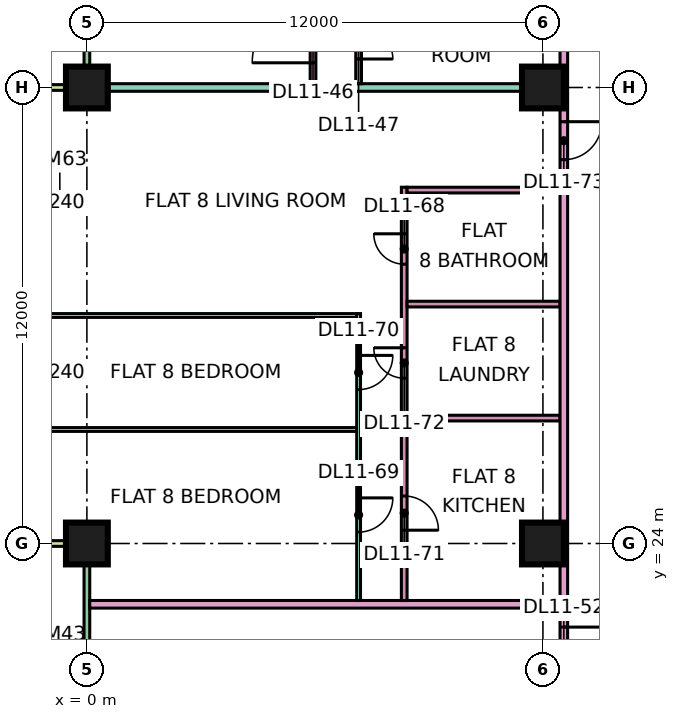
"""IFC4 building model, lengths in metres.
Left out: names, types, materials, properties, quantities, classifications, styles, units other than length and angle.
Written with IfcOpenShell. Run it as: python <this file> out.ifc"""

import sys

from ifc_helpers import new_model, si_unit, direction, frame, frame_2d, origin, origin_2d, place, context, subcontext, project, spatial, rectangle, extrude, element, fill, save


model = new_model("IFC4")
c1 = context("Model", 3, precision=1e-05, world=origin(), true_north=direction((0.0, 1.0)))
c2 = subcontext(c1, "Body", "Model", "MODEL_VIEW")
j1 = project(units=[si_unit("LENGTHUNIT", "METRE"), si_unit("PLANEANGLEUNIT", "RADIAN")], contexts=[c1])
p1 = place(None, origin())
s1 = spatial("IfcSite", under=j1, at=p1, CompositionType="ELEMENT")
p2 = place(p1, origin())
s2 = spatial("IfcBuilding", under=s1, at=p2, CompositionType="ELEMENT")
p3 = place(p2, frame((0.0, 0.0, 56.4)))
s3 = spatial("IfcBuildingStorey", under=s2, at=p3, CompositionType="ELEMENT", Elevation=56.4)
p4 = place(p3, frame((0.0, 24.0, 0.0), z_axis=(0.0, 0.0, 1.0), x_axis=(1.0, 0.0, 0.0)))
e1 = element("IfcColumn", 1, at=p4, inside=s3, PredefinedType="COLUMN", context=c2, shape_type="SweptSolid", body=[
    extrude(rectangle(XDim=1.1, YDim=1.1, at=origin_2d()), origin(), (0.0, 0.0, 1.0), 3.75),
])
p5 = place(p3, frame((0.0, 36.0, 0.0), z_axis=(0.0, 0.0, 1.0), x_axis=(1.0, 0.0, 0.0)))
e2 = element("IfcColumn", 2, at=p5, inside=s3, PredefinedType="COLUMN", context=c2, shape_type="SweptSolid", body=[
    extrude(rectangle(XDim=1.1, YDim=1.1, at=origin_2d()), origin(), (0.0, 0.0, 1.0), 3.75),
])
for number, where, z_axis, x_axis in (
    (3, (12.0, 24.0, 0.0), (0.0, 0.0, 1.0), (1.0, 0.0, 0.0)),
    (4, (12.0, 36.0, 0.0), (0.0, 0.0, 1.0), (1.0, 0.0, 0.0)),
):
    element("IfcColumn", number, at=place(p3, frame(where, z_axis=z_axis, x_axis=x_axis)), inside=s3, PredefinedType="COLUMN", context=c2, shape_type="SweptSolid", body=[
        extrude(rectangle(XDim=1.1, YDim=1.1, at=origin_2d()), origin(), (0.0, 0.0, 1.0), 3.75),
    ])
p6 = place(p3, frame((0.0, 47.925, 0.0), z_axis=(0.0, 0.0, 1.0), x_axis=(0.0, -1.0, 0.0)))
e5 = element("IfcWall", 5, at=p6, inside=s3, PredefinedType="SOLIDWALL", context=c2, shape_type="SweptSolid", body=[
    extrude(rectangle(XDim=11.85, YDim=0.15, at=frame_2d((5.925, 0.0))), origin(), (0.0, 0.0, 1.0), 3.35),
])
p7 = place(p6, frame((0.538, 0.0, 0.45)))
e6 = element("IfcOpeningElement", 6, at=p7, cuts=e5, PredefinedType="OPENING", context=c2, shape_type="SweptSolid", body=[
    extrude(rectangle(XDim=1.2, YDim=2.4, at=frame_2d((0.6, 1.2))), frame((0.0, 0.085, 0.0), z_axis=(0.0, -1.0, 0.0), x_axis=(1.0, 0.0, 0.0)), (0.0, 0.0, 1.0), 0.17),
])
p8 = place(p6, frame((4.15, 0.0, 0.45)))
e7 = element("IfcOpeningElement", 7, at=p8, cuts=e5, PredefinedType="OPENING", context=c2, shape_type="SweptSolid", body=[
    extrude(rectangle(XDim=1.2, YDim=2.4, at=frame_2d((0.6, 1.2))), frame((0.0, 0.085, 0.0), z_axis=(0.0, -1.0, 0.0), x_axis=(1.0, 0.0, 0.0)), (0.0, 0.0, 1.0), 0.17),
])
p9 = place(p6, frame((6.525, 0.0, 0.0)))
e8 = element("IfcOpeningElement", 8, at=p9, cuts=e5, PredefinedType="OPENING", context=c2, shape_type="SweptSolid", body=[
    extrude(rectangle(XDim=1.8, YDim=2.4, at=frame_2d((0.9, 1.2))), frame((0.0, 0.085, 0.0), z_axis=(0.0, -1.0, 0.0), x_axis=(1.0, 0.0, 0.0)), (0.0, 0.0, 1.0), 0.17),
])
p10 = place(p6, frame((9.5, 0.0, 0.45)))
e9 = element("IfcOpeningElement", 9, at=p10, cuts=e5, PredefinedType="OPENING", context=c2, shape_type="SweptSolid", body=[
    extrude(rectangle(XDim=1.2, YDim=2.4, at=frame_2d((0.6, 1.2))), frame((0.0, 0.085, 0.0), z_axis=(0.0, -1.0, 0.0), x_axis=(1.0, 0.0, 0.0)), (0.0, 0.0, 1.0), 0.17),
])
p11 = place(p3, frame((-1.5, 36.0, 0.0), z_axis=(0.0, 0.0, 1.0), x_axis=(1.0, 0.0, 0.0)))
e10 = element("IfcWall", 10, at=p11, inside=s3, PredefinedType="SOLIDWALL", context=c2, shape_type="SweptSolid", body=[
    extrude(rectangle(XDim=1.5, YDim=0.15, at=frame_2d((0.75, 0.0))), origin(), (0.0, 0.0, 1.0), 3.35),
])
p12 = place(p3, frame((0.0, 23.925, 0.0), z_axis=(0.0, 0.0, 1.0), x_axis=(0.0, -1.0, 0.0)))
e11 = element("IfcWall", 11, at=p12, inside=s3, PredefinedType="SOLIDWALL", context=c2, shape_type="SweptSolid", body=[
    extrude(rectangle(XDim=11.35, YDim=0.15, at=frame_2d((5.675, 0.0))), origin(), (0.0, 0.0, 1.0), 3.35),
])
p13 = place(p12, frame((6.738, 0.0, 0.0)))
e12 = element("IfcOpeningElement", 12, at=p13, cuts=e11, PredefinedType="OPENING", context=c2, shape_type="SweptSolid", body=[
    extrude(rectangle(XDim=1.8, YDim=2.4, at=frame_2d((0.9, 1.2))), frame((0.0, 0.085, 0.0), z_axis=(0.0, -1.0, 0.0), x_axis=(1.0, 0.0, 0.0)), (0.0, 0.0, 1.0), 0.17),
])
p14 = place(p3, frame((-1.5, 24.0, 0.0), z_axis=(0.0, 0.0, 1.0), x_axis=(1.0, 0.0, 0.0)))
e13 = element("IfcWall", 13, at=p14, inside=s3, PredefinedType="SOLIDWALL", context=c2, shape_type="SweptSolid", body=[
    extrude(rectangle(XDim=1.5, YDim=0.15, at=frame_2d((0.75, 0.0))), origin(), (0.0, 0.0, 1.0), 3.35),
])
p15 = place(p3, frame((-1.351, 27.0, 0.0), z_axis=(0.0, 0.0, 1.0), x_axis=(1.0, 0.0, 0.0)))
e14 = element("IfcWall", 14, at=p15, inside=s3, PredefinedType="PARTITIONING", context=c2, shape_type="SweptSolid", body=[
    extrude(rectangle(XDim=8.451, YDim=0.1, at=frame_2d((4.226, 0.0))), origin(), (0.0, 0.0, 1.0), 3.35),
])
p16 = place(p3, frame((-1.35, 30.0, 0.0), z_axis=(0.0, 0.0, 1.0), x_axis=(1.0, 0.0, 0.0)))
e15 = element("IfcWall", 15, at=p16, inside=s3, PredefinedType="PARTITIONING", context=c2, shape_type="SweptSolid", body=[
    extrude(rectangle(XDim=8.45, YDim=0.1, at=frame_2d((4.225, 0.0))), origin(), (0.0, 0.0, 1.0), 3.35),
])
e16 = element("IfcWall", 16, at=p5, inside=s3, PredefinedType="PARTITIONING", context=c2, shape_type="SweptSolid", body=[
    extrude(rectangle(XDim=12.45, YDim=0.2, at=frame_2d((6.225, 0.0))), origin(), (0.0, 0.0, 1.0), 3.35),
])
p17 = place(p3, frame((0.074, 22.4, 0.0), z_axis=(0.0, 0.0, 1.0), x_axis=(1.0, 0.0, 0.0)))
e17 = element("IfcWall", 17, at=p17, inside=s3, PredefinedType="PARTITIONING", context=c2, shape_type="SweptSolid", body=[
    extrude(rectangle(XDim=12.376, YDim=0.2, at=frame_2d((6.188, 0.0))), origin(), (0.0, 0.0, 1.0), 3.35),
])
p18 = place(p3, frame((5.95, 36.1, 0.0), z_axis=(0.0, 0.0, 1.0), x_axis=(0.0, 1.0, 0.0)))
e18 = element("IfcWall", 18, at=p18, inside=s3, PredefinedType="PARTITIONING", context=c2, shape_type="SweptSolid", body=[
    extrude(rectangle(XDim=28.25, YDim=0.15, at=frame_2d((14.125, 0.0))), origin(), (0.0, 0.0, 1.0), 3.35),
])
p19 = place(p18, frame((3.95, 0.0, 0.0)))
e19 = element("IfcOpeningElement", 19, at=p19, cuts=e18, PredefinedType="OPENING", context=c2, shape_type="SweptSolid", body=[
    extrude(rectangle(XDim=0.9, YDim=2.1, at=frame_2d((0.45, 1.05))), frame((0.0, 0.085, 0.0), z_axis=(0.0, -1.0, 0.0), x_axis=(1.0, 0.0, 0.0)), (0.0, 0.0, 1.0), 0.17),
])
p20 = place(p18, frame((12.95, 0.0, 0.0)))
e20 = element("IfcOpeningElement", 20, at=p20, cuts=e18, PredefinedType="OPENING", context=c2, shape_type="SweptSolid", body=[
    extrude(rectangle(XDim=0.9, YDim=2.1, at=frame_2d((0.45, 1.05))), frame((0.0, 0.085, 0.0), z_axis=(0.0, -1.0, 0.0), x_axis=(1.0, 0.0, 0.0)), (0.0, 0.0, 1.0), 0.17),
])
p21 = place(p18, frame((18.95, 0.0, 0.0)))
e21 = element("IfcOpeningElement", 21, at=p21, cuts=e18, PredefinedType="OPENING", context=c2, shape_type="SweptSolid", body=[
    extrude(rectangle(XDim=0.9, YDim=2.1, at=frame_2d((0.45, 1.05))), frame((0.0, 0.085, 0.0), z_axis=(0.0, -1.0, 0.0), x_axis=(1.0, 0.0, 0.0)), (0.0, 0.0, 1.0), 0.17),
])
p22 = place(p18, frame((21.95, 0.0, 0.0)))
e22 = element("IfcOpeningElement", 22, at=p22, cuts=e18, PredefinedType="OPENING", context=c2, shape_type="SweptSolid", body=[
    extrude(rectangle(XDim=0.9, YDim=2.1, at=frame_2d((0.45, 1.05))), frame((0.0, 0.085, 0.0), z_axis=(0.0, -1.0, 0.0), x_axis=(1.0, 0.0, 0.0)), (0.0, 0.0, 1.0), 0.17),
])
p23 = place(p18, frame((24.95, 0.0, 0.0)))
e23 = element("IfcOpeningElement", 23, at=p23, cuts=e18, PredefinedType="OPENING", context=c2, shape_type="SweptSolid", body=[
    extrude(rectangle(XDim=0.9, YDim=2.1, at=frame_2d((0.45, 1.05))), frame((0.0, 0.085, 0.0), z_axis=(0.0, -1.0, 0.0), x_axis=(1.0, 0.0, 0.0)), (0.0, 0.0, 1.0), 0.17),
])
p24 = place(p18, frame((15.95, 0.0, 0.0)))
e24 = element("IfcOpeningElement", 24, at=p24, cuts=e18, PredefinedType="OPENING", context=c2, shape_type="SweptSolid", body=[
    extrude(rectangle(XDim=0.9, YDim=2.1, at=frame_2d((0.45, 1.05))), frame((0.0, 0.085, 0.0), z_axis=(0.0, -1.0, 0.0), x_axis=(1.0, 0.0, 0.0)), (0.0, 0.0, 1.0), 0.17),
])
p25 = place(p18, frame((10.8, 0.0, 0.0)))
e25 = element("IfcOpeningElement", 25, at=p25, cuts=e18, PredefinedType="OPENING", context=c2, shape_type="SweptSolid", body=[
    extrude(rectangle(XDim=0.8, YDim=2.1, at=frame_2d((0.4, 1.05))), frame((0.0, 0.085, 0.0), z_axis=(0.0, -1.0, 0.0), x_axis=(1.0, 0.0, 0.0)), (0.0, 0.0, 1.0), 0.17),
])
p26 = place(p18, frame((0.55, 0.0, 0.0)))
e26 = element("IfcOpeningElement", 26, at=p26, cuts=e18, PredefinedType="OPENING", context=c2, shape_type="SweptSolid", body=[
    extrude(rectangle(XDim=1.6, YDim=2.1, at=frame_2d((0.8, 1.05))), frame((0.0, 0.085, 0.0), z_axis=(0.0, -1.0, 0.0), x_axis=(1.0, 0.0, 0.0)), (0.0, 0.0, 1.0), 0.17),
])
p27 = place(p18, frame((6.95, 0.0, 0.0)))
e27 = element("IfcOpeningElement", 27, at=p27, cuts=e18, PredefinedType="OPENING", context=c2, shape_type="SweptSolid", body=[
    extrude(rectangle(XDim=0.9, YDim=2.1, at=frame_2d((0.45, 1.05))), frame((0.0, 0.085, 0.0), z_axis=(0.0, -1.0, 0.0), x_axis=(1.0, 0.0, 0.0)), (0.0, 0.0, 1.0), 0.17),
])
p28 = place(p3, frame((7.15, 22.5, 0.0), z_axis=(0.0, 0.0, 1.0), x_axis=(0.0, 1.0, 0.0)))
e28 = element("IfcWall", 28, at=p28, inside=s3, PredefinedType="PARTITIONING", context=c2, shape_type="SweptSolid", body=[
    extrude(rectangle(XDim=7.55, YDim=0.1, at=frame_2d((3.775, 0.0))), origin(), (0.0, 0.0, 1.0), 3.35),
])
p29 = place(p28, frame((1.8, 0.0, 0.0)))
e29 = element("IfcOpeningElement", 29, at=p29, cuts=e28, PredefinedType="OPENING", context=c2, shape_type="SweptSolid", body=[
    extrude(rectangle(XDim=0.9, YDim=2.1, at=frame_2d((0.45, 1.05))), frame((0.0, 0.06, 0.0), z_axis=(0.0, -1.0, 0.0), x_axis=(1.0, 0.0, 0.0)), (0.0, 0.0, 1.0), 0.12),
])
p30 = place(p28, frame((5.55, 0.0, 0.0)))
e30 = element("IfcOpeningElement", 30, at=p30, cuts=e28, PredefinedType="OPENING", context=c2, shape_type="SweptSolid", body=[
    extrude(rectangle(XDim=0.9, YDim=2.1, at=frame_2d((0.45, 1.05))), frame((0.0, 0.06, 0.0), z_axis=(0.0, -1.0, 0.0), x_axis=(1.0, 0.0, 0.0)), (0.0, 0.0, 1.0), 0.12),
])
p31 = place(p3, frame((7.15, 36.1, 0.0), z_axis=(0.0, 0.0, 1.0), x_axis=(0.0, 1.0, 0.0)))
e31 = element("IfcWall", 31, at=p31, inside=s3, PredefinedType="PARTITIONING", context=c2, shape_type="SweptSolid", body=[
    extrude(rectangle(XDim=23.35, YDim=0.15, at=frame_2d((11.675, 0.0))), origin(), (0.0, 0.0, 1.0), 3.35),
])
p32 = place(p31, frame((10.25, 0.0, 0.0)))
e32 = element("IfcOpeningElement", 32, at=p32, cuts=e31, PredefinedType="OPENING", context=c2, shape_type="SweptSolid", body=[
    extrude(rectangle(XDim=0.8, YDim=2.1, at=frame_2d((0.4, 1.05))), frame((0.0, 0.085, 0.0), z_axis=(0.0, -1.0, 0.0), x_axis=(1.0, 0.0, 0.0)), (0.0, 0.0, 1.0), 0.17),
])
p33 = place(p31, frame((19.85, 0.0, 0.0)))
e33 = element("IfcOpeningElement", 33, at=p33, cuts=e31, PredefinedType="OPENING", context=c2, shape_type="SweptSolid", body=[
    extrude(rectangle(XDim=0.9, YDim=2.1, at=frame_2d((0.45, 1.05))), frame((0.0, 0.085, 0.0), z_axis=(0.0, -1.0, 0.0), x_axis=(1.0, 0.0, 0.0)), (0.0, 0.0, 1.0), 0.17),
])
p34 = place(p31, frame((3.65, 0.0, 0.0)))
e34 = element("IfcOpeningElement", 34, at=p34, cuts=e31, PredefinedType="OPENING", context=c2, shape_type="SweptSolid", body=[
    extrude(rectangle(XDim=0.8, YDim=2.1, at=frame_2d((0.4, 1.05))), frame((0.0, 0.085, 0.0), z_axis=(0.0, -1.0, 0.0), x_axis=(1.0, 0.0, 0.0)), (0.0, 0.0, 1.0), 0.17),
])
p35 = place(p31, frame((13.25, 0.0, 0.0)))
e35 = element("IfcOpeningElement", 35, at=p35, cuts=e31, PredefinedType="OPENING", context=c2, shape_type="SweptSolid", body=[
    extrude(rectangle(XDim=0.8, YDim=2.1, at=frame_2d((0.4, 1.05))), frame((0.0, 0.085, 0.0), z_axis=(0.0, -1.0, 0.0), x_axis=(1.0, 0.0, 0.0)), (0.0, 0.0, 1.0), 0.17),
])
p36 = place(p31, frame((15.65, 0.0, 0.0)))
e36 = element("IfcOpeningElement", 36, at=p36, cuts=e31, PredefinedType="OPENING", context=c2, shape_type="SweptSolid", body=[
    extrude(rectangle(XDim=0.8, YDim=2.1, at=frame_2d((0.4, 1.05))), frame((0.0, 0.085, 0.0), z_axis=(0.0, -1.0, 0.0), x_axis=(1.0, 0.0, 0.0)), (0.0, 0.0, 1.0), 0.17),
])
p37 = place(p31, frame((0.65, 0.0, 0.0)))
e37 = element("IfcOpeningElement", 37, at=p37, cuts=e31, PredefinedType="OPENING", context=c2, shape_type="SweptSolid", body=[
    extrude(rectangle(XDim=0.9, YDim=2.1, at=frame_2d((0.45, 1.05))), frame((0.0, 0.085, 0.0), z_axis=(0.0, -1.0, 0.0), x_axis=(1.0, 0.0, 0.0)), (0.0, 0.0, 1.0), 0.17),
])
p38 = place(p31, frame((6.95, 0.0, 0.0)))
e38 = element("IfcOpeningElement", 38, at=p38, cuts=e31, PredefinedType="OPENING", context=c2, shape_type="SweptSolid", body=[
    extrude(rectangle(XDim=0.8, YDim=2.1, at=frame_2d((0.4, 1.05))), frame((0.0, 0.085, 0.0), z_axis=(0.0, -1.0, 0.0), x_axis=(1.0, 0.0, 0.0)), (0.0, 0.0, 1.0), 0.17),
])
p39 = place(p3, frame((8.35, 22.5, 0.0), z_axis=(0.0, 0.0, 1.0), x_axis=(0.0, 1.0, 0.0)))
e39 = element("IfcWall", 39, at=p39, inside=s3, PredefinedType="PARTITIONING", context=c2, shape_type="SweptSolid", body=[
    extrude(rectangle(XDim=10.875, YDim=0.15, at=frame_2d((5.438, 0.0))), origin(), (0.0, 0.0, 1.0), 3.35),
])
p40 = place(p39, frame((8.85, 0.0, 0.0)))
e40 = element("IfcOpeningElement", 40, at=p40, cuts=e39, PredefinedType="OPENING", context=c2, shape_type="SweptSolid", body=[
    extrude(rectangle(XDim=0.8, YDim=2.1, at=frame_2d((0.4, 1.05))), frame((0.0, 0.085, 0.0), z_axis=(0.0, -1.0, 0.0), x_axis=(1.0, 0.0, 0.0)), (0.0, 0.0, 1.0), 0.17),
])
p41 = place(p39, frame((1.85, 0.0, 0.0)))
e41 = element("IfcOpeningElement", 41, at=p41, cuts=e39, PredefinedType="OPENING", context=c2, shape_type="SweptSolid", body=[
    extrude(rectangle(XDim=0.9, YDim=2.1, at=frame_2d((0.45, 1.05))), frame((0.0, 0.085, 0.0), z_axis=(0.0, -1.0, 0.0), x_axis=(1.0, 0.0, 0.0)), (0.0, 0.0, 1.0), 0.17),
])
p42 = place(p39, frame((5.85, 0.0, 0.0)))
e42 = element("IfcOpeningElement", 42, at=p42, cuts=e39, PredefinedType="OPENING", context=c2, shape_type="SweptSolid", body=[
    extrude(rectangle(XDim=0.8, YDim=2.1, at=frame_2d((0.4, 1.05))), frame((0.0, 0.085, 0.0), z_axis=(0.0, -1.0, 0.0), x_axis=(1.0, 0.0, 0.0)), (0.0, 0.0, 1.0), 0.17),
])
for number, where, z_axis, x_axis in (
    (43, (8.425, 27.3, 0.0), (0.0, 0.0, 1.0), (1.0, 0.0, 0.0)),
    (44, (8.425, 30.3, 0.0), (0.0, 0.0, 1.0), (1.0, 0.0, 0.0)),
    (45, (8.425, 33.3, 0.0), (0.0, 0.0, 1.0), (1.0, 0.0, 0.0)),
):
    element("IfcWall", number, at=place(p3, frame(where, z_axis=z_axis, x_axis=x_axis)), inside=s3, PredefinedType="PARTITIONING", context=c2, shape_type="SweptSolid", body=[
        extrude(rectangle(XDim=4.025, YDim=0.15, at=frame_2d((2.012, 0.0))), origin(), (0.0, 0.0, 1.0), 3.35),
    ])
p43 = place(p3, frame((12.55, 20.0, 0.0), z_axis=(0.0, 0.0, 1.0), x_axis=(0.0, 1.0, 0.0)))
e46 = element("IfcWall", 46, at=p43, inside=s3, PredefinedType="PARTITIONING", context=c2, shape_type="SweptSolid", body=[
    extrude(rectangle(XDim=42.926, YDim=0.2, at=frame_2d((21.463, 0.0))), origin(), (0.0, 0.0, 1.0), 3.35),
])
p44 = place(p43, frame((40.65, 0.0, 0.0)))
e47 = element("IfcOpeningElement", 47, at=p44, cuts=e46, PredefinedType="OPENING", context=c2, shape_type="SweptSolid", body=[
    extrude(rectangle(XDim=1.0, YDim=2.1, at=frame_2d((0.5, 1.05))), frame((0.0, 0.11, 0.0), z_axis=(0.0, -1.0, 0.0), x_axis=(1.0, 0.0, 0.0)), (0.0, 0.0, 1.0), 0.22),
])
p45 = place(p43, frame((0.6, 0.0, 0.0)))
e48 = element("IfcOpeningElement", 48, at=p45, cuts=e46, PredefinedType="OPENING", context=c2, shape_type="SweptSolid", body=[
    extrude(rectangle(XDim=1.2, YDim=2.1, at=frame_2d((0.6, 1.05))), frame((0.0, 0.11, 0.0), z_axis=(0.0, -1.0, 0.0), x_axis=(1.0, 0.0, 0.0)), (0.0, 0.0, 1.0), 0.22),
])
p46 = place(p43, frame((14.1, 0.0, 0.0)))
e49 = element("IfcOpeningElement", 49, at=p46, cuts=e46, PredefinedType="OPENING", context=c2, shape_type="SweptSolid", body=[
    extrude(rectangle(XDim=1.0, YDim=2.1, at=frame_2d((0.5, 1.05))), frame((0.0, 0.11, 0.0), z_axis=(0.0, -1.0, 0.0), x_axis=(1.0, 0.0, 0.0)), (0.0, 0.0, 1.0), 0.22),
])
p47 = place(p26, origin())
e50 = element("IfcDoor", 50, at=p47, inside=s3, OperationType="DOUBLE_DOOR_SINGLE_SWING", PredefinedType="DOOR", context=c2, shape_type="SweptSolid", body=[
    extrude(rectangle(XDim=1.6, YDim=2.1, at=frame_2d((0.8, 1.05))), frame((0.0, 0.025, 0.0), z_axis=(0.0, -1.0, 0.0), x_axis=(1.0, 0.0, 0.0)), (0.0, 0.0, 1.0), 0.05),
])
fill(e26, e50)
p48 = place(p37, frame((0.9, 0.0, 0.0), z_axis=(0.0, 0.0, 1.0), x_axis=(-1.0, 0.0, 0.0)))
e51 = element("IfcDoor", 51, at=p48, inside=s3, OperationType="SINGLE_SWING_LEFT", PredefinedType="DOOR", context=c2, shape_type="SweptSolid", body=[
    extrude(rectangle(XDim=0.9, YDim=2.1, at=frame_2d((0.45, 1.05))), frame((0.0, 0.025, 0.0), z_axis=(0.0, -1.0, 0.0), x_axis=(1.0, 0.0, 0.0)), (0.0, 0.0, 1.0), 0.05),
])
fill(e37, e51)
p49 = place(p45, origin())
e52 = element("IfcDoor", 52, at=p49, inside=s3, OperationType="SINGLE_SWING_RIGHT", PredefinedType="DOOR", context=c2, shape_type="SweptSolid", body=[
    extrude(rectangle(XDim=1.2, YDim=2.1, at=frame_2d((0.6, 1.05))), frame((0.0, 0.025, 0.0), z_axis=(0.0, -1.0, 0.0), x_axis=(1.0, 0.0, 0.0)), (0.0, 0.0, 1.0), 0.05),
])
fill(e48, e52)
p50 = place(p40, frame((0.8, 0.0, 0.0), z_axis=(0.0, 0.0, 1.0), x_axis=(-1.0, 0.0, 0.0)))
e53 = element("IfcDoor", 53, at=p50, inside=s3, OperationType="SINGLE_SWING_RIGHT", PredefinedType="DOOR", context=c2, shape_type="SweptSolid", body=[
    extrude(rectangle(XDim=0.8, YDim=2.1, at=frame_2d((0.4, 1.05))), frame((0.0, 0.025, 0.0), z_axis=(0.0, -1.0, 0.0), x_axis=(1.0, 0.0, 0.0)), (0.0, 0.0, 1.0), 0.05),
])
fill(e40, e53)
p51 = place(p29, origin())
e54 = element("IfcDoor", 54, at=p51, inside=s3, OperationType="SINGLE_SWING_RIGHT", PredefinedType="DOOR", context=c2, shape_type="SweptSolid", body=[
    extrude(rectangle(XDim=0.9, YDim=2.1, at=frame_2d((0.45, 1.05))), frame((0.0, 0.025, 0.0), z_axis=(0.0, -1.0, 0.0), x_axis=(1.0, 0.0, 0.0)), (0.0, 0.0, 1.0), 0.05),
])
fill(e29, e54)
p52 = place(p30, origin())
e55 = element("IfcDoor", 55, at=p52, inside=s3, OperationType="SINGLE_SWING_RIGHT", PredefinedType="DOOR", context=c2, shape_type="SweptSolid", body=[
    extrude(rectangle(XDim=0.9, YDim=2.1, at=frame_2d((0.45, 1.05))), frame((0.0, 0.025, 0.0), z_axis=(0.0, -1.0, 0.0), x_axis=(1.0, 0.0, 0.0)), (0.0, 0.0, 1.0), 0.05),
])
fill(e30, e55)
p53 = place(p41, frame((0.9, 0.0, 0.0), z_axis=(0.0, 0.0, 1.0), x_axis=(-1.0, 0.0, 0.0)))
e56 = element("IfcDoor", 56, at=p53, inside=s3, OperationType="SINGLE_SWING_LEFT", PredefinedType="DOOR", context=c2, shape_type="SweptSolid", body=[
    extrude(rectangle(XDim=0.9, YDim=2.1, at=frame_2d((0.45, 1.05))), frame((0.0, 0.025, 0.0), z_axis=(0.0, -1.0, 0.0), x_axis=(1.0, 0.0, 0.0)), (0.0, 0.0, 1.0), 0.05),
])
fill(e41, e56)
p54 = place(p42, frame((0.8, 0.0, 0.0), z_axis=(0.0, 0.0, 1.0), x_axis=(-1.0, 0.0, 0.0)))
e57 = element("IfcDoor", 57, at=p54, inside=s3, OperationType="SINGLE_SWING_RIGHT", PredefinedType="DOOR", context=c2, shape_type="SweptSolid", body=[
    extrude(rectangle(XDim=0.8, YDim=2.1, at=frame_2d((0.4, 1.05))), frame((0.0, 0.025, 0.0), z_axis=(0.0, -1.0, 0.0), x_axis=(1.0, 0.0, 0.0)), (0.0, 0.0, 1.0), 0.05),
])
fill(e42, e57)
p55 = place(p46, origin())
e58 = element("IfcDoor", 58, at=p55, inside=s3, OperationType="SINGLE_SWING_RIGHT", PredefinedType="DOOR", context=c2, shape_type="SweptSolid", body=[
    extrude(rectangle(XDim=1.0, YDim=2.1, at=frame_2d((0.5, 1.05))), frame((0.0, 0.025, 0.0), z_axis=(0.0, -1.0, 0.0), x_axis=(1.0, 0.0, 0.0)), (0.0, 0.0, 1.0), 0.05),
])
fill(e49, e58)
save(model, sys.argv[1])
